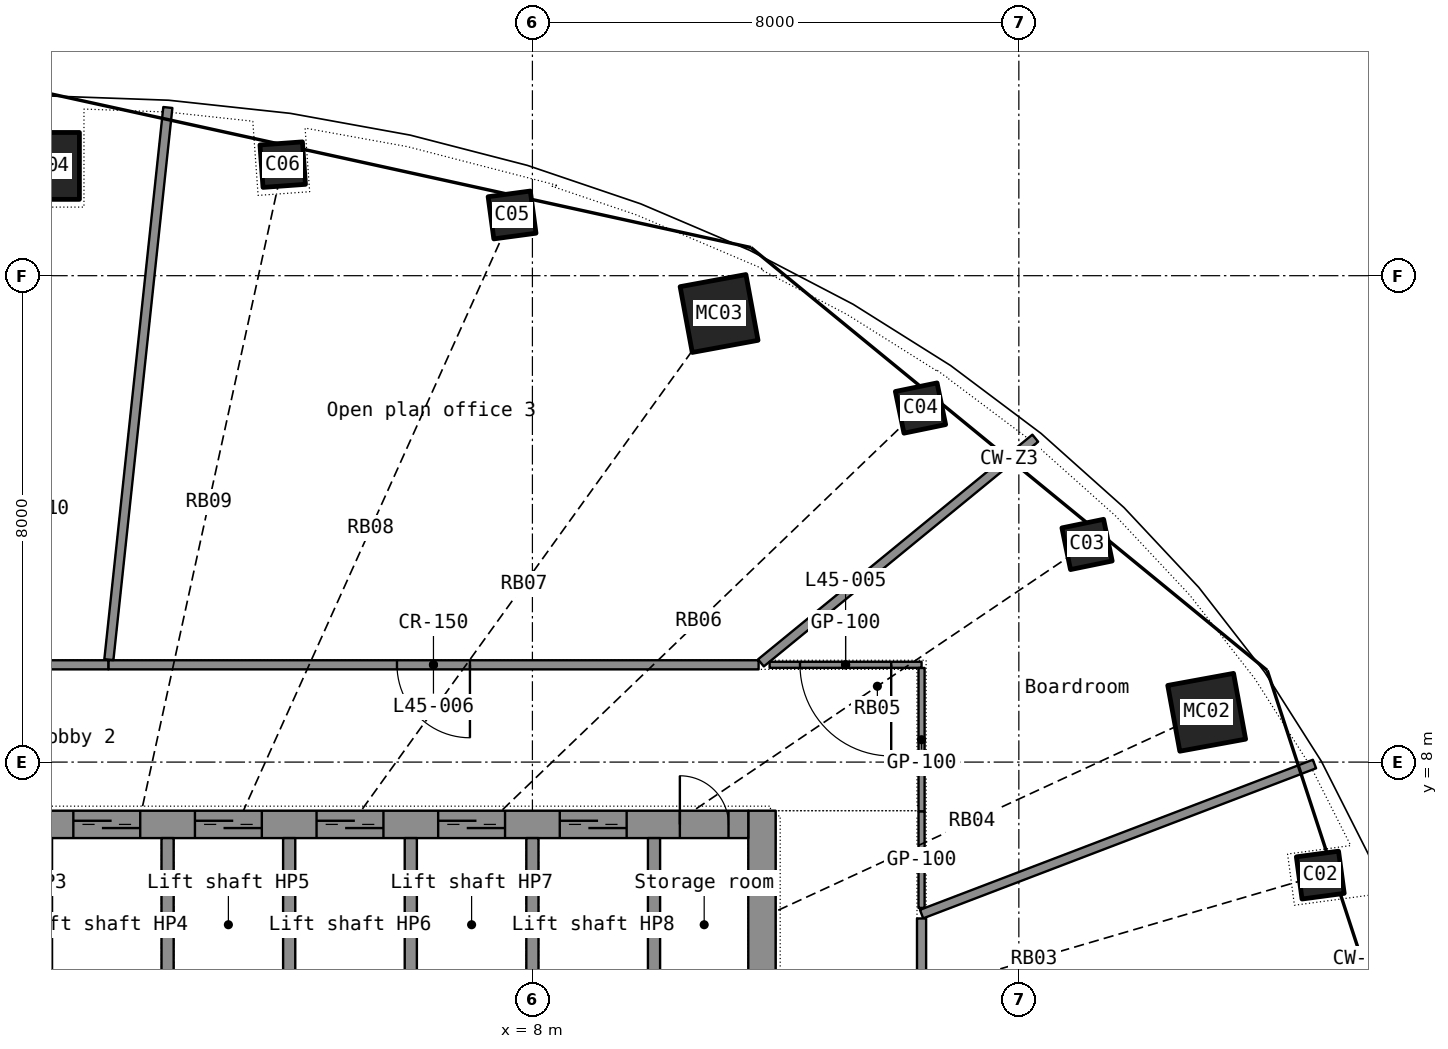
"""IFC4 building model, lengths in metres.
Left out: names, types, materials, properties, quantities, classifications, styles, units other than length and angle.
Written with IfcOpenShell. Run it as: python <this file> out.ifc"""

import sys

from ifc_helpers import new_model, si_unit, direction, frame, frame_2d, origin, origin_2d, place, context, subcontext, project, spatial, rectangle, hollow_rectangle, extrude, element, fill, save


model = new_model("IFC4")
c1 = context("Model", 3, precision=1e-05, world=origin(), true_north=direction((0.0, 1.0)))
c2 = subcontext(c1, "Body", "Model", "MODEL_VIEW")
j1 = project(units=[si_unit("LENGTHUNIT", "METRE"), si_unit("PLANEANGLEUNIT", "RADIAN")], contexts=[c1])
p1 = place(None, origin())
s1 = spatial("IfcSite", under=j1, at=p1, CompositionType="ELEMENT")
p2 = place(p1, origin())
s2 = spatial("IfcBuilding", under=s1, at=p2, CompositionType="ELEMENT")
p3 = place(p2, frame((0.0, 0.0, 186.7)))
s3 = spatial("IfcBuildingStorey", under=s2, at=p3, CompositionType="ELEMENT", Elevation=186.7)
p4 = place(p3, frame((20.958, 6.141, 0.0), z_axis=(-0.032511791, -0.009694185, 0.999424337), x_axis=(0.41031519, -0.911932659, 0.004502229)))
e1 = element("IfcColumn", 1, at=p4, inside=s3, PredefinedType="COLUMN", context=c2, shape_type="SweptSolid", body=[
    extrude(hollow_rectangle(XDim=0.7, YDim=0.7, WallThickness=0.025, at=origin_2d()), origin(), (0.0, 0.0, 1.0), 3.702),
])
p5 = place(p3, frame((19.089, 8.819, 0.0), z_axis=(-0.029940667, -0.01417895, 0.999451106), x_axis=(0.583774225, -0.811894089, 0.005970061)))
e2 = element("IfcColumn", 2, at=p5, inside=s3, PredefinedType="COLUMN", context=c2, shape_type="SweptSolid", body=[
    extrude(hollow_rectangle(XDim=1.1, YDim=1.1, WallThickness=0.032, at=origin_2d()), origin(), (0.0, 0.0, 1.0), 3.702),
])
p6 = place(p3, frame((17.122, 11.58, 0.0), z_axis=(-0.026512179, -0.018202391, 0.999482755), x_axis=(0.720370987, -0.693558709, 0.006477528)))
e3 = element("IfcColumn", 3, at=p6, inside=s3, PredefinedType="COLUMN", context=c2, shape_type="SweptSolid", body=[
    extrude(hollow_rectangle(XDim=0.7, YDim=0.7, WallThickness=0.025, at=origin_2d()), origin(), (0.0, 0.0, 1.0), 3.702),
])
p7 = place(p3, frame((14.383, 13.823, 0.0), z_axis=(-0.022292076, -0.0216985, 0.999516002), x_axis=(0.827617793, -0.561257006, 0.00627392)))
e4 = element("IfcColumn", 4, at=p7, inside=s3, PredefinedType="COLUMN", context=c2, shape_type="SweptSolid", body=[
    extrude(hollow_rectangle(XDim=0.7, YDim=0.7, WallThickness=0.025, at=origin_2d()), origin(), (0.0, 0.0, 1.0), 3.702),
])
p8 = place(p3, frame((11.07, 15.378, 0.0), z_axis=(-0.017346173, -0.024535271, 0.999548463), x_axis=(0.907569861, -0.419865826, 0.0054438)))
e5 = element("IfcColumn", 5, at=p8, inside=s3, PredefinedType="COLUMN", context=c2, shape_type="SweptSolid", body=[
    extrude(hollow_rectangle(XDim=1.1, YDim=1.1, WallThickness=0.032, at=origin_2d()), origin(), (0.0, 0.0, 1.0), 3.702),
])
for number, where, z_axis, x_axis in (
    (6, (7.665, 16.999, 0.0), (-0.012, -0.027, 1.0), (0.96, -0.279, 0.004)),
    (7, (3.894, 17.826, 0.0), (-0.006, -0.028, 1.0), (0.99, -0.14, 0.002)),
):
    element("IfcColumn", number, at=place(p3, frame(where, z_axis=z_axis, x_axis=x_axis)), inside=s3, PredefinedType="COLUMN", context=c2, shape_type="SweptSolid", body=[
        extrude(hollow_rectangle(XDim=0.7, YDim=0.7, WallThickness=0.025, at=origin_2d()), origin(), (0.0, 0.0, 1.0), 3.701),
    ])
p9 = place(p3, frame((0.0, 17.805, 0.0), z_axis=(0.0, -0.028296154, 0.999599584), x_axis=(1.0, 0.0, 0.0)))
e8 = element("IfcColumn", 8, at=p9, inside=s3, PredefinedType="COLUMN", context=c2, shape_type="SweptSolid", body=[
    extrude(hollow_rectangle(XDim=1.1, YDim=1.1, WallThickness=0.032, at=origin_2d()), origin(), (0.0, 0.0, 1.0), 3.701),
])
p10 = place(p3, frame((11.775, -7.2, 0.0), z_axis=(0.0, 0.0, 1.0), x_axis=(0.0, 1.0, 0.0)))
e9 = element("IfcWall", 9, at=p10, inside=s3, PredefinedType="SHEAR", context=c2, shape_type="SweptSolid", body=[
    extrude(rectangle(XDim=14.4, YDim=0.45, at=frame_2d((7.2, 0.0))), origin(), (0.0, 0.0, 1.0), 3.3),
])
p11 = place(p10, frame((6.5, 0.0, 0.0)))
e10 = element("IfcOpeningElement", 10, at=p11, cuts=e9, PredefinedType="OPENING", context=c2, shape_type="SweptSolid", body=[
    extrude(rectangle(XDim=1.4, YDim=2.2, at=frame_2d((0.7, 1.1))), frame((0.0, 0.235, 0.0), z_axis=(0.0, -1.0, 0.0), x_axis=(1.0, 0.0, 0.0)), (0.0, 0.0, 1.0), 0.47),
])
p12 = place(p3, frame((-11.55, 6.975, 0.0), z_axis=(0.0, 0.0, 1.0), x_axis=(1.0, 0.0, 0.0)))
e11 = element("IfcWall", 11, at=p12, inside=s3, PredefinedType="SHEAR", context=c2, shape_type="SweptSolid", body=[
    extrude(rectangle(XDim=23.1, YDim=0.45, at=frame_2d((11.55, 0.0))), origin(), (0.0, 0.0, 1.0), 3.3),
])
p13 = place(p12, frame((2.0, 0.0, 0.0)))
e12 = element("IfcOpeningElement", 12, at=p13, cuts=e11, PredefinedType="OPENING", context=c2, shape_type="SweptSolid", body=[
    extrude(rectangle(XDim=1.1, YDim=2.2, at=frame_2d((0.55, 1.1))), frame((0.0, 0.235, 0.0), z_axis=(0.0, -1.0, 0.0), x_axis=(1.0, 0.0, 0.0)), (0.0, 0.0, 1.0), 0.47),
])
p14 = place(p12, frame((6.0, 0.0, 0.0)))
e13 = element("IfcOpeningElement", 13, at=p14, cuts=e11, PredefinedType="OPENING", context=c2, shape_type="SweptSolid", body=[
    extrude(rectangle(XDim=1.1, YDim=2.2, at=frame_2d((0.55, 1.1))), frame((0.0, 0.235, 0.0), z_axis=(0.0, -1.0, 0.0), x_axis=(1.0, 0.0, 0.0)), (0.0, 0.0, 1.0), 0.47),
])
p15 = place(p12, frame((8.0, 0.0, 0.0)))
e14 = element("IfcOpeningElement", 14, at=p15, cuts=e11, PredefinedType="OPENING", context=c2, shape_type="SweptSolid", body=[
    extrude(rectangle(XDim=1.1, YDim=2.2, at=frame_2d((0.55, 1.1))), frame((0.0, 0.235, 0.0), z_axis=(0.0, -1.0, 0.0), x_axis=(1.0, 0.0, 0.0)), (0.0, 0.0, 1.0), 0.47),
])
p16 = place(p12, frame((10.0, 0.0, 0.0)))
e15 = element("IfcOpeningElement", 15, at=p16, cuts=e11, PredefinedType="OPENING", context=c2, shape_type="SweptSolid", body=[
    extrude(rectangle(XDim=1.1, YDim=2.2, at=frame_2d((0.55, 1.1))), frame((0.0, 0.235, 0.0), z_axis=(0.0, -1.0, 0.0), x_axis=(1.0, 0.0, 0.0)), (0.0, 0.0, 1.0), 0.47),
])
p17 = place(p12, frame((12.0, 0.0, 0.0)))
e16 = element("IfcOpeningElement", 16, at=p17, cuts=e11, PredefinedType="OPENING", context=c2, shape_type="SweptSolid", body=[
    extrude(rectangle(XDim=1.1, YDim=2.2, at=frame_2d((0.55, 1.1))), frame((0.0, 0.235, 0.0), z_axis=(0.0, -1.0, 0.0), x_axis=(1.0, 0.0, 0.0)), (0.0, 0.0, 1.0), 0.47),
])
p18 = place(p12, frame((14.0, 0.0, 0.0)))
e17 = element("IfcOpeningElement", 17, at=p18, cuts=e11, PredefinedType="OPENING", context=c2, shape_type="SweptSolid", body=[
    extrude(rectangle(XDim=1.1, YDim=2.2, at=frame_2d((0.55, 1.1))), frame((0.0, 0.235, 0.0), z_axis=(0.0, -1.0, 0.0), x_axis=(1.0, 0.0, 0.0)), (0.0, 0.0, 1.0), 0.47),
])
p19 = place(p12, frame((16.0, 0.0, 0.0)))
e18 = element("IfcOpeningElement", 18, at=p19, cuts=e11, PredefinedType="OPENING", context=c2, shape_type="SweptSolid", body=[
    extrude(rectangle(XDim=1.1, YDim=2.2, at=frame_2d((0.55, 1.1))), frame((0.0, 0.235, 0.0), z_axis=(0.0, -1.0, 0.0), x_axis=(1.0, 0.0, 0.0)), (0.0, 0.0, 1.0), 0.47),
])
p20 = place(p12, frame((18.0, 0.0, 0.0)))
e19 = element("IfcOpeningElement", 19, at=p20, cuts=e11, PredefinedType="OPENING", context=c2, shape_type="SweptSolid", body=[
    extrude(rectangle(XDim=1.1, YDim=2.2, at=frame_2d((0.55, 1.1))), frame((0.0, 0.235, 0.0), z_axis=(0.0, -1.0, 0.0), x_axis=(1.0, 0.0, 0.0)), (0.0, 0.0, 1.0), 0.47),
])
p21 = place(p12, frame((20.0, 0.0, 0.0)))
e20 = element("IfcOpeningElement", 20, at=p21, cuts=e11, PredefinedType="OPENING", context=c2, shape_type="SweptSolid", body=[
    extrude(rectangle(XDim=1.1, YDim=2.2, at=frame_2d((0.55, 1.1))), frame((0.0, 0.235, 0.0), z_axis=(0.0, -1.0, 0.0), x_axis=(1.0, 0.0, 0.0)), (0.0, 0.0, 1.0), 0.47),
])
p22 = place(p12, frame((4.1, 0.0, 0.0)))
e21 = element("IfcOpeningElement", 21, at=p22, cuts=e11, PredefinedType="OPENING", context=c2, shape_type="SweptSolid", body=[
    extrude(rectangle(XDim=0.9, YDim=2.1, at=frame_2d((0.45, 1.05))), frame((0.0, 0.235, 0.0), z_axis=(0.0, -1.0, 0.0), x_axis=(1.0, 0.0, 0.0)), (0.0, 0.0, 1.0), 0.47),
])
p23 = place(p12, frame((0.325, 0.0, 0.0)))
e22 = element("IfcOpeningElement", 22, at=p23, cuts=e11, PredefinedType="OPENING", context=c2, shape_type="SweptSolid", body=[
    extrude(rectangle(XDim=0.8, YDim=2.05, at=frame_2d((0.4, 1.025))), frame((0.0, 0.235, 0.0), z_axis=(0.0, -1.0, 0.0), x_axis=(1.0, 0.0, 0.0)), (0.0, 0.0, 1.0), 0.47),
])
p24 = place(p12, frame((21.975, 0.0, 0.0)))
e23 = element("IfcOpeningElement", 23, at=p24, cuts=e11, PredefinedType="OPENING", context=c2, shape_type="SweptSolid", body=[
    extrude(rectangle(XDim=0.8, YDim=2.05, at=frame_2d((0.4, 1.025))), frame((0.0, 0.235, 0.0), z_axis=(0.0, -1.0, 0.0), x_axis=(1.0, 0.0, 0.0)), (0.0, 0.0, 1.0), 0.47),
])
for number, where, z_axis, x_axis in (
    (24, (2.0, 3.9, 0.0), (0.0, 0.0, 1.0), (0.0, 1.0, 0.0)),
    (25, (4.0, 3.9, 0.0), (0.0, 0.0, 1.0), (0.0, 1.0, 0.0)),
    (26, (6.0, 3.9, 0.0), (0.0, 0.0, 1.0), (0.0, 1.0, 0.0)),
    (27, (8.0, 3.9, 0.0), (0.0, 0.0, 1.0), (0.0, 1.0, 0.0)),
    (28, (10.0, 3.9, 0.0), (0.0, 0.0, 1.0), (0.0, 1.0, 0.0)),
):
    element("IfcWall", number, at=place(p3, frame(where, z_axis=z_axis, x_axis=x_axis)), inside=s3, PredefinedType="SHEAR", context=c2, shape_type="SweptSolid", body=[
        extrude(rectangle(XDim=2.85, YDim=0.2, at=frame_2d((1.425, 0.0))), origin(), (0.0, 0.0, 1.0), 3.3),
    ])
p25 = place(p3, frame((11.72, 9.6, 0.0), z_axis=(0.0, 0.0, 1.0), x_axis=(-1.0, 0.0, 0.0)))
e29 = element("IfcWall", 29, at=p25, inside=s3, PredefinedType="PARTITIONING", context=c2, shape_type="SweptSolid", body=[
    extrude(rectangle(XDim=10.695, YDim=0.15, at=frame_2d((5.347, 0.0))), origin(), (0.0, 0.0, 1.0), 2.4),
])
p26 = place(p25, frame((4.747, 0.0, 0.0)))
e30 = element("IfcOpeningElement", 30, at=p26, cuts=e29, PredefinedType="OPENING", context=c2, shape_type="SweptSolid", body=[
    extrude(rectangle(XDim=1.2, YDim=2.2, at=frame_2d((0.6, 1.1))), frame((0.0, 0.085, 0.0), z_axis=(0.0, -1.0, 0.0), x_axis=(1.0, 0.0, 0.0)), (0.0, 0.0, 1.0), 0.17),
])
p27 = place(p3, frame((2.004, 18.766, 0.0), z_axis=(0.0, 0.0, 1.0), x_axis=(-0.106208417, -0.99434389, 0.0)))
e31 = element("IfcWall", 31, at=p27, inside=s3, PredefinedType="PARTITIONING", context=c2, shape_type="SweptSolid", body=[
    extrude(rectangle(XDim=9.133, YDim=0.15, at=frame_2d((4.566, 0.0))), origin(), (0.0, 0.0, 1.0), 2.4),
])
p28 = place(p3, frame((20.862, 7.969, 0.0), z_axis=(0.0, 0.0, 1.0), x_axis=(-0.934170905, -0.356825897, 0.0)))
e32 = element("IfcWall", 32, at=p28, inside=s3, PredefinedType="PARTITIONING", context=c2, shape_type="SweptSolid", body=[
    extrude(rectangle(XDim=6.917, YDim=0.15, at=frame_2d((3.458, 0.0))), origin(), (0.0, 0.0, 1.0), 2.4),
])
p29 = place(p3, frame((1.025, 9.6, 0.0), z_axis=(0.0, 0.0, 1.0), x_axis=(-1.0, 0.0, 0.0)))
e33 = element("IfcWall", 33, at=p29, inside=s3, PredefinedType="PARTITIONING", context=c2, shape_type="SweptSolid", body=[
    extrude(rectangle(XDim=6.49, YDim=0.15, at=frame_2d((3.245, 0.0))), origin(), (0.0, 0.0, 1.0), 2.4),
])
p30 = place(p29, frame((2.645, 0.0, 0.0)))
e34 = element("IfcOpeningElement", 34, at=p30, cuts=e33, PredefinedType="OPENING", context=c2, shape_type="SweptSolid", body=[
    extrude(rectangle(XDim=1.2, YDim=2.2, at=frame_2d((0.6, 1.1))), frame((0.0, 0.085, 0.0), z_axis=(0.0, -1.0, 0.0), x_axis=(1.0, 0.0, 0.0)), (0.0, 0.0, 1.0), 0.17),
])
p31 = place(p3, frame((16.27, 13.327, 0.0), z_axis=(0.0, 0.0, 1.0), x_axis=(-0.773587881, -0.633689033, 0.0)))
e35 = element("IfcWall", 35, at=p31, inside=s3, PredefinedType="PARTITIONING", context=c2, shape_type="SweptSolid", body=[
    extrude(rectangle(XDim=5.832, YDim=0.15, at=frame_2d((2.916, 0.0))), origin(), (0.0, 0.0, 1.0), 2.4),
])
p32 = place(p3, frame((14.4, 1.577, 0.0), z_axis=(0.0, 0.0, 1.0), x_axis=(0.0, 1.0, 0.0)))
e36 = element("IfcWall", 36, at=p32, inside=s3, PredefinedType="PARTITIONING", context=c2, shape_type="SweptSolid", body=[
    extrude(rectangle(XDim=3.851, YDim=0.15, at=frame_2d((1.926, 0.0))), origin(), (0.0, 0.0, 1.0), 2.4),
])
p33 = place(p3, frame((14.4, 9.6, 0.0), z_axis=(0.0, 0.0, 1.0), x_axis=(-1.0, 0.0, 0.0)))
e37 = element("IfcWall", 37, at=p33, inside=s3, PredefinedType="PARTITIONING", context=c2, shape_type="SweptSolid", body=[
    extrude(rectangle(XDim=2.499, YDim=0.1, at=frame_2d((1.249, 0.0))), origin(), (0.0, 0.0, 1.0), 2.4),
])
p34 = place(p33, frame((0.499, 0.0, 0.0)))
e38 = element("IfcOpeningElement", 38, at=p34, cuts=e37, PredefinedType="OPENING", context=c2, shape_type="SweptSolid", body=[
    extrude(rectangle(XDim=1.5, YDim=2.4, at=frame_2d((0.75, 1.2))), frame((0.0, 0.06, 0.0), z_axis=(0.0, -1.0, 0.0), x_axis=(1.0, 0.0, 0.0)), (0.0, 0.0, 1.0), 0.12),
])
p35 = place(p3, frame((14.4, 7.188, 0.0), z_axis=(0.0, 0.0, 1.0), x_axis=(0.0, 1.0, 0.0)))
e39 = element("IfcWall", 39, at=p35, inside=s3, PredefinedType="PARTITIONING", context=c2, shape_type="SweptSolid", body=[
    extrude(rectangle(XDim=2.36, YDim=0.1, at=frame_2d((1.18, 0.0))), origin(), (0.0, 0.0, 1.0), 2.4),
])
p36 = place(p3, frame((14.4, 5.602, 0.0), z_axis=(0.0, 0.0, 1.0), x_axis=(0.0, 1.0, 0.0)))
e40 = element("IfcWall", 40, at=p36, inside=s3, PredefinedType="PARTITIONING", context=c2, shape_type="SweptSolid", body=[
    extrude(rectangle(XDim=1.585, YDim=0.1, at=frame_2d((0.793, 0.0))), origin(), (0.0, 0.0, 1.0), 2.4),
])
p37 = place(p17, origin())
e41 = element("IfcDoor", 41, at=p37, inside=s3, OperationType="DOUBLE_DOOR_SLIDING", PredefinedType="DOOR", context=c2, shape_type="SweptSolid", body=[
    extrude(rectangle(XDim=1.1, YDim=2.2, at=frame_2d((0.55, 1.1))), frame((0.0, 0.025, 0.0), z_axis=(0.0, -1.0, 0.0), x_axis=(1.0, 0.0, 0.0)), (0.0, 0.0, 1.0), 0.05),
])
fill(e16, e41)
p38 = place(p18, origin())
e42 = element("IfcDoor", 42, at=p38, inside=s3, OperationType="DOUBLE_DOOR_SLIDING", PredefinedType="DOOR", context=c2, shape_type="SweptSolid", body=[
    extrude(rectangle(XDim=1.1, YDim=2.2, at=frame_2d((0.55, 1.1))), frame((0.0, 0.025, 0.0), z_axis=(0.0, -1.0, 0.0), x_axis=(1.0, 0.0, 0.0)), (0.0, 0.0, 1.0), 0.05),
])
fill(e17, e42)
p39 = place(p19, origin())
e43 = element("IfcDoor", 43, at=p39, inside=s3, OperationType="DOUBLE_DOOR_SLIDING", PredefinedType="DOOR", context=c2, shape_type="SweptSolid", body=[
    extrude(rectangle(XDim=1.1, YDim=2.2, at=frame_2d((0.55, 1.1))), frame((0.0, 0.025, 0.0), z_axis=(0.0, -1.0, 0.0), x_axis=(1.0, 0.0, 0.0)), (0.0, 0.0, 1.0), 0.05),
])
fill(e18, e43)
p40 = place(p20, origin())
e44 = element("IfcDoor", 44, at=p40, inside=s3, OperationType="DOUBLE_DOOR_SLIDING", PredefinedType="DOOR", context=c2, shape_type="SweptSolid", body=[
    extrude(rectangle(XDim=1.1, YDim=2.2, at=frame_2d((0.55, 1.1))), frame((0.0, 0.025, 0.0), z_axis=(0.0, -1.0, 0.0), x_axis=(1.0, 0.0, 0.0)), (0.0, 0.0, 1.0), 0.05),
])
fill(e19, e44)
p41 = place(p21, origin())
e45 = element("IfcDoor", 45, at=p41, inside=s3, OperationType="DOUBLE_DOOR_SLIDING", PredefinedType="DOOR", context=c2, shape_type="SweptSolid", body=[
    extrude(rectangle(XDim=1.1, YDim=2.2, at=frame_2d((0.55, 1.1))), frame((0.0, 0.025, 0.0), z_axis=(0.0, -1.0, 0.0), x_axis=(1.0, 0.0, 0.0)), (0.0, 0.0, 1.0), 0.05),
])
fill(e20, e45)
p42 = place(p24, origin())
e46 = element("IfcDoor", 46, at=p42, inside=s3, OperationType="SINGLE_SWING_LEFT", PredefinedType="DOOR", context=c2, shape_type="SweptSolid", body=[
    extrude(rectangle(XDim=0.8, YDim=2.05, at=frame_2d((0.4, 1.025))), frame((0.0, 0.025, 0.0), z_axis=(0.0, -1.0, 0.0), x_axis=(1.0, 0.0, 0.0)), (0.0, 0.0, 1.0), 0.05),
])
fill(e23, e46)
p43 = place(p34, origin())
e47 = element("IfcDoor", 47, at=p43, inside=s3, OperationType="DOUBLE_DOOR_SINGLE_SWING", PredefinedType="DOOR", context=c2, shape_type="SweptSolid", body=[
    extrude(rectangle(XDim=1.5, YDim=2.4, at=frame_2d((0.75, 1.2))), frame((0.0, 0.025, 0.0), z_axis=(0.0, -1.0, 0.0), x_axis=(1.0, 0.0, 0.0)), (0.0, 0.0, 1.0), 0.05),
])
fill(e38, e47)
p44 = place(p26, origin())
e48 = element("IfcDoor", 48, at=p44, inside=s3, OperationType="DOUBLE_DOOR_SINGLE_SWING", PredefinedType="DOOR", context=c2, shape_type="SweptSolid", body=[
    extrude(rectangle(XDim=1.2, YDim=2.2, at=frame_2d((0.6, 1.1))), frame((0.0, 0.025, 0.0), z_axis=(0.0, -1.0, 0.0), x_axis=(1.0, 0.0, 0.0)), (0.0, 0.0, 1.0), 0.05),
])
fill(e30, e48)
save(model, sys.argv[1])
